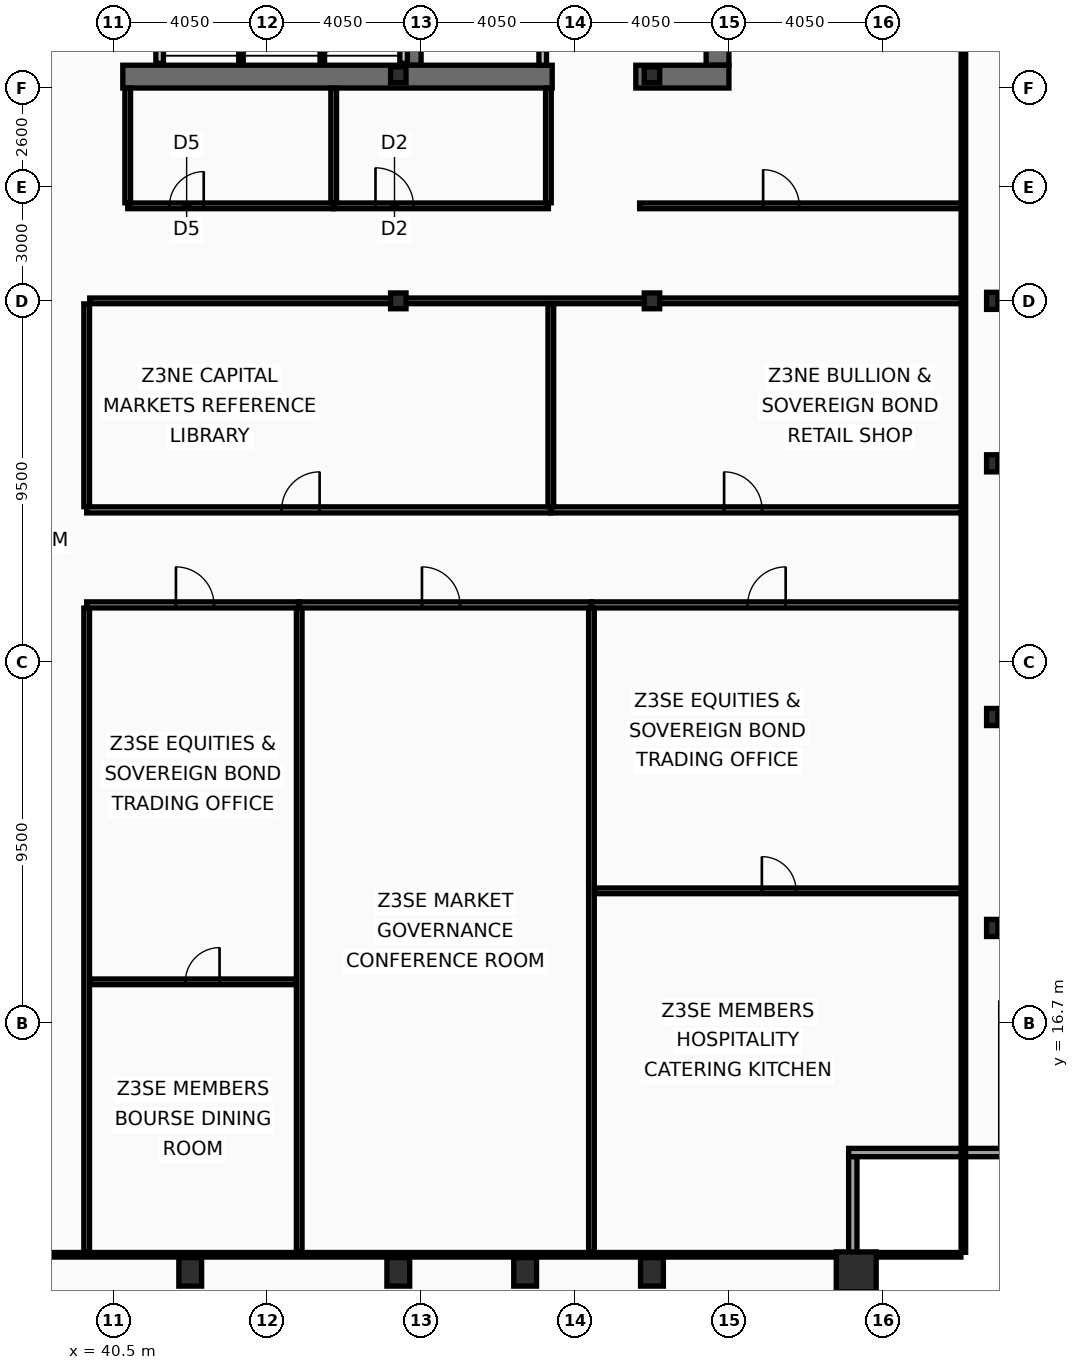
"""IFC4 building model, lengths in metres.
Left out: names, types, materials, properties, quantities, classifications, styles, units other than length and angle.
Written with IfcOpenShell. Run it as: python <this file> out.ifc"""

import sys

from ifc_helpers import new_model, si_unit, direction, frame, frame_2d, origin, origin_2d, place, context, subcontext, project, spatial, rectangle, hollow_rectangle, i_section, extrude, element, fill, save


model = new_model("IFC4")
c1 = context("Model", 3, precision=1e-05, world=origin(), true_north=direction((0.0, 1.0)))
c2 = subcontext(c1, "Body", "Model", "MODEL_VIEW")
j1 = project(units=[si_unit("LENGTHUNIT", "METRE"), si_unit("PLANEANGLEUNIT", "RADIAN")], contexts=[c1])
p1 = place(None, origin())
s1 = spatial("IfcSite", under=j1, at=p1, CompositionType="ELEMENT")
p2 = place(p1, origin())
s2 = spatial("IfcBuilding", under=s1, at=p2, CompositionType="ELEMENT")
p3 = place(p2, frame((0.0, 0.0, 242.6)))
s3 = spatial("IfcBuildingStorey", under=s2, at=p3, CompositionType="ELEMENT", Elevation=242.6)
p4 = place(p3, frame((56.4, 53.1, 0.0), z_axis=(0.0, 0.0, 1.0), x_axis=(0.0, -1.0, 0.0)))
e1 = element("IfcWall", 1, at=p4, inside=s3, PredefinedType="SHEAR", context=c2, shape_type="SweptSolid", body=[
    extrude(rectangle(XDim=11.2, YDim=0.6, at=frame_2d((5.6, 0.0))), origin(), (0.0, 0.0, 1.0), 3.44),
])
p5 = place(p3, frame((48.4, 41.9, 0.0), z_axis=(0.0, 0.0, 1.0), x_axis=(0.0, 1.0, 0.0)))
e2 = element("IfcWall", 2, at=p5, inside=s3, PredefinedType="SHEAR", context=c2, shape_type="SweptSolid", body=[
    extrude(rectangle(XDim=11.2, YDim=0.4, at=frame_2d((5.6, 0.0))), origin(), (0.0, 0.0, 1.0), 3.44),
])
p6 = place(p3, frame((52.05, 41.6, 0.0), z_axis=(0.0, 0.0, 1.0), x_axis=(-1.0, 0.0, 0.0)))
e3 = element("IfcWall", 3, at=p6, inside=s3, PredefinedType="SHEAR", context=c2, shape_type="SweptSolid", body=[
    extrude(rectangle(XDim=11.3, YDim=0.6, at=frame_2d((5.65, 0.0))), origin(), (0.0, 0.0, 1.0), 3.44),
])
p7 = place(p3, frame((56.7, 41.6, 0.0), z_axis=(0.0, 0.0, 1.0), x_axis=(-1.0, 0.0, 0.0)))
e4 = element("IfcWall", 4, at=p7, inside=s3, PredefinedType="SHEAR", context=c2, shape_type="SweptSolid", body=[
    extrude(rectangle(XDim=2.45, YDim=0.6, at=frame_2d((1.225, 0.0))), origin(), (0.0, 0.0, 1.0), 3.44),
])
p8 = place(p3, frame((60.05, 10.15, 0.0), z_axis=(0.0, 0.0, 1.0), x_axis=(1.0, 0.0, 0.0)))
e5 = element("IfcColumn", 5, at=p8, inside=s3, PredefinedType="COLUMN", context=c2, shape_type="SweptSolid", body=[
    extrude(hollow_rectangle(XDim=1.05, YDim=1.05, WallThickness=0.055, at=origin_2d()), origin(), (0.0, 0.0, 1.0), 3.6),
])
for number, where, z_axis, x_axis in (
    (6, (42.525, 10.15, 0.0), (0.0, 0.0, 1.0), (1.0, 0.0, 0.0)),
    (7, (48.0, 10.15, 0.0), (0.0, 0.0, 1.0), (1.0, 0.0, 0.0)),
    (8, (51.337, 10.15, 0.0), (0.0, 0.0, 1.0), (1.0, 0.0, 0.0)),
    (9, (54.675, 10.15, 0.0), (0.0, 0.0, 1.0), (1.0, 0.0, 0.0)),
):
    element("IfcColumn", number, at=place(p3, frame(where, z_axis=z_axis, x_axis=x_axis)), inside=s3, PredefinedType="COLUMN", context=c2, shape_type="SweptSolid", body=[
        extrude(hollow_rectangle(XDim=0.6, YDim=0.75, WallThickness=0.045, at=origin_2d()), origin(), (0.0, 0.0, 1.0), 3.6),
    ])
for number, where, z_axis, x_axis in (
    (10, (63.63, 19.2, 0.0), (0.0, 0.0, 1.0), (1.0, 0.0, 0.0)),
    (11, (63.63, 24.75, 0.0), (0.0, 0.0, 1.0), (1.0, 0.0, 0.0)),
    (12, (63.63, 31.425, 0.0), (0.0, 0.0, 1.0), (1.0, 0.0, 0.0)),
    (13, (63.63, 35.7, 0.0), (0.0, 0.0, 1.0), (1.0, 0.0, 0.0)),
):
    element("IfcColumn", number, at=place(p3, frame(where, z_axis=z_axis, x_axis=x_axis)), inside=s3, PredefinedType="COLUMN", context=c2, shape_type="SweptSolid", body=[
        extrude(i_section(OverallWidth=0.3, OverallDepth=0.45, WebThickness=0.014, FlangeThickness=0.026, at=origin_2d()), origin(), (0.0, 0.0, 1.0), 3.6),
    ])
for number, where, z_axis, x_axis in (
    (14, (48.0, 35.7, 0.0), (0.0, 0.0, 1.0), (1.0, 0.0, 0.0)),
    (15, (48.0, 41.65, 0.0), (0.0, 0.0, 1.0), (1.0, 0.0, 0.0)),
    (16, (54.675, 35.7, 0.0), (0.0, 0.0, 1.0), (1.0, 0.0, 0.0)),
    (17, (54.675, 41.65, 0.0), (0.0, 0.0, 1.0), (1.0, 0.0, 0.0)),
):
    element("IfcColumn", number, at=place(p3, frame(where, z_axis=z_axis, x_axis=x_axis)), inside=s3, PredefinedType="COLUMN", context=c2, shape_type="SweptSolid", body=[
        extrude(i_section(OverallWidth=0.406, OverallDepth=0.416, WebThickness=0.03, FlangeThickness=0.048, at=origin_2d()), origin(), (0.0, 0.0, 1.0), 3.6),
    ])
p9 = place(p3, frame((64.07, 13.29, 0.0), z_axis=(0.0, 0.0, 1.0), x_axis=(-1.0, 0.0, 0.0)))
e18 = element("IfcWall", 18, at=p9, inside=s3, PredefinedType="SOLIDWALL", context=c2, shape_type="SweptSolid", body=[
    extrude(rectangle(XDim=4.22, YDim=0.22, at=frame_2d((2.11, 0.0))), origin(), (0.0, 0.0, 1.0), 2.83),
])
p10 = place(p3, frame((59.96, 13.18, 0.0), z_axis=(0.0, 0.0, 1.0), x_axis=(0.0, -1.0, 0.0)))
e19 = element("IfcWall", 19, at=p10, inside=s3, PredefinedType="SOLIDWALL", context=c2, shape_type="SweptSolid", body=[
    extrude(rectangle(XDim=3.91, YDim=0.22, at=frame_2d((1.955, 0.0))), origin(), (0.0, 0.0, 1.0), 2.83),
])
p11 = place(p3, frame((51.8, 41.9, 0.0), z_axis=(0.0, 0.0, 1.0), x_axis=(0.0, 1.0, 0.0)))
e20 = element("IfcWall", 20, at=p11, inside=s3, PredefinedType="PARTITIONING", context=c2, shape_type="SweptSolid", body=[
    extrude(rectangle(XDim=2.595, YDim=0.2, at=frame_2d((1.298, 0.0))), origin(), (0.0, 0.0, 1.0), 3.44),
])
p12 = place(p11, frame((0.38, 0.0, 0.0)))
e21 = element("IfcOpeningElement", 21, at=p12, cuts=e20, PredefinedType="OPENING", context=c2, shape_type="SweptSolid", body=[
    extrude(rectangle(XDim=1.05, YDim=2.15, at=frame_2d((0.525, 1.075))), frame((0.0, 0.11, 0.0), z_axis=(0.0, -1.0, 0.0), x_axis=(1.0, 0.0, 0.0)), (0.0, 0.0, 1.0), 0.22),
])
for number, where, z_axis, x_axis in (
    (22, (41.72, 41.95, 0.0), (0.0, 0.0, 1.0), (0.0, 1.0, 0.0)),
    (23, (48.14, 41.95, 0.0), (0.0, 0.0, 1.0), (0.0, 1.0, 0.0)),
):
    element("IfcWall", number, at=place(p3, frame(where, z_axis=z_axis, x_axis=x_axis)), inside=s3, PredefinedType="PARTITIONING", context=c2, shape_type="SweptSolid", body=[
        extrude(rectangle(XDim=2.295, YDim=0.2, at=frame_2d((1.147, 0.0))), origin(), (0.0, 0.0, 1.0), 3.44),
    ])
for number, where, z_axis, x_axis in (
    (24, (43.86, 41.95, 0.0), (0.0, 0.0, 1.0), (0.0, 1.0, 0.0)),
    (25, (46.0, 41.95, 0.0), (0.0, 0.0, 1.0), (0.0, 1.0, 0.0)),
):
    element("IfcWall", number, at=place(p3, frame(where, z_axis=z_axis, x_axis=x_axis)), inside=s3, PredefinedType="PARTITIONING", context=c2, shape_type="SweptSolid", body=[
        extrude(rectangle(XDim=2.295, YDim=0.12, at=frame_2d((1.147, 0.0))), origin(), (0.0, 0.0, 1.0), 3.44),
    ])
p13 = place(p3, frame((40.88, 38.2, 0.0), z_axis=(0.0, 0.0, 1.0), x_axis=(1.0, 0.0, 0.0)))
e26 = element("IfcWall", 26, at=p13, inside=s3, PredefinedType="PARTITIONING", context=c2, shape_type="SweptSolid", body=[
    extrude(rectangle(XDim=5.42, YDim=0.15, at=frame_2d((2.71, 0.0))), origin(), (0.0, 0.0, 1.0), 2.78),
])
p14 = place(p13, frame((1.1, 0.0, 0.0)))
e27 = element("IfcOpeningElement", 27, at=p14, cuts=e26, PredefinedType="OPENING", context=c2, shape_type="SweptSolid", body=[
    extrude(rectangle(XDim=0.9, YDim=2.05, at=frame_2d((0.45, 1.025))), frame((0.0, 0.085, 0.0), z_axis=(0.0, -1.0, 0.0), x_axis=(1.0, 0.0, 0.0)), (0.0, 0.0, 1.0), 0.17),
])
p15 = place(p3, frame((46.3, 38.2, 0.0), z_axis=(0.0, 0.0, 1.0), x_axis=(1.0, 0.0, 0.0)))
e28 = element("IfcWall", 28, at=p15, inside=s3, PredefinedType="PARTITIONING", context=c2, shape_type="SweptSolid", body=[
    extrude(rectangle(XDim=5.65, YDim=0.15, at=frame_2d((2.825, 0.0))), origin(), (0.0, 0.0, 1.0), 2.78),
])
p16 = place(p15, frame((1.1, 0.0, 0.0)))
e29 = element("IfcOpeningElement", 29, at=p16, cuts=e28, PredefinedType="OPENING", context=c2, shape_type="SweptSolid", body=[
    extrude(rectangle(XDim=1.0, YDim=2.05, at=frame_2d((0.5, 1.025))), frame((0.0, 0.085, 0.0), z_axis=(0.0, -1.0, 0.0), x_axis=(1.0, 0.0, 0.0)), (0.0, 0.0, 1.0), 0.17),
])
for number, where, z_axis, x_axis in (
    (30, (40.88, 38.28, 0.0), (0.0, 0.0, 1.0), (0.0, 1.0, 0.0)),
    (31, (46.3, 38.28, 0.0), (0.0, 0.0, 1.0), (0.0, 1.0, 0.0)),
    (32, (51.95, 38.28, 0.0), (0.0, 0.0, 1.0), (0.0, 1.0, 0.0)),
):
    element("IfcWall", number, at=place(p3, frame(where, z_axis=z_axis, x_axis=x_axis)), inside=s3, PredefinedType="PARTITIONING", context=c2, shape_type="SweptSolid", body=[
        extrude(rectangle(XDim=3.02, YDim=0.15, at=frame_2d((1.51, 0.0))), origin(), (0.0, 0.0, 1.0), 3.44),
    ])
p17 = place(p3, frame((54.35, 38.2, 0.0), z_axis=(0.0, 0.0, 1.0), x_axis=(1.0, 0.0, 0.0)))
e33 = element("IfcWall", 33, at=p17, inside=s3, PredefinedType="PARTITIONING", context=c2, shape_type="SweptSolid", body=[
    extrude(rectangle(XDim=8.52, YDim=0.15, at=frame_2d((4.26, 0.0))), origin(), (0.0, 0.0, 1.0), 2.78),
])
p18 = place(p17, frame((3.25, 0.0, 0.0)))
e34 = element("IfcOpeningElement", 34, at=p18, cuts=e33, PredefinedType="OPENING", context=c2, shape_type="SweptSolid", body=[
    extrude(rectangle(XDim=0.95, YDim=2.05, at=frame_2d((0.475, 1.025))), frame((0.0, 0.085, 0.0), z_axis=(0.0, -1.0, 0.0), x_axis=(1.0, 0.0, 0.0)), (0.0, 0.0, 1.0), 0.17),
])
p19 = place(p3, frame((39.8, 10.665, 0.0), z_axis=(0.0, 0.0, 1.0), x_axis=(0.0, 1.0, 0.0)))
e35 = element("IfcWall", 35, at=p19, inside=s3, PredefinedType="PARTITIONING", context=c2, shape_type="SweptSolid", body=[
    extrude(rectangle(XDim=16.95, YDim=0.15, at=frame_2d((8.475, 0.0))), origin(), (0.0, 0.0, 1.0), 2.98),
])
p20 = place(p3, frame((39.8, 30.285, 0.0), z_axis=(0.0, 0.0, 1.0), x_axis=(0.0, 1.0, 0.0)))
e36 = element("IfcWall", 36, at=p20, inside=s3, PredefinedType="PARTITIONING", context=c2, shape_type="SweptSolid", body=[
    extrude(rectangle(XDim=5.335, YDim=0.15, at=frame_2d((2.667, 0.0))), origin(), (0.0, 0.0, 1.0), 2.98),
])
p21 = place(p3, frame((39.88, 35.7, 0.0), z_axis=(0.0, 0.0, 1.0), x_axis=(1.0, 0.0, 0.0)))
e37 = element("IfcWall", 37, at=p21, inside=s3, PredefinedType="PARTITIONING", context=c2, shape_type="SweptSolid", body=[
    extrude(rectangle(XDim=22.925, YDim=0.15, at=frame_2d((11.462, 0.0))), origin(), (0.0, 0.0, 1.0), 2.78),
])
p22 = place(p3, frame((39.8, 27.7, 0.0), z_axis=(0.0, 0.0, 1.0), x_axis=(1.0, 0.0, 0.0)))
e38 = element("IfcWall", 38, at=p22, inside=s3, PredefinedType="PARTITIONING", context=c2, shape_type="SweptSolid", body=[
    extrude(rectangle(XDim=5.593, YDim=0.16, at=frame_2d((2.796, 0.0))), origin(), (0.0, 0.0, 1.0), 2.78),
])
p23 = place(p22, frame((2.349, 0.0, 0.0)))
e39 = element("IfcOpeningElement", 39, at=p23, cuts=e38, PredefinedType="OPENING", context=c2, shape_type="SweptSolid", body=[
    extrude(rectangle(XDim=1.0, YDim=2.05, at=frame_2d((0.5, 1.025))), frame((0.0, 0.09, 0.0), z_axis=(0.0, -1.0, 0.0), x_axis=(1.0, 0.0, 0.0)), (0.0, 0.0, 1.0), 0.18),
])
p24 = place(p3, frame((39.88, 17.782, 0.0), z_axis=(0.0, 0.0, 1.0), x_axis=(1.0, 0.0, 0.0)))
e40 = element("IfcWall", 40, at=p24, inside=s3, PredefinedType="PARTITIONING", context=c2, shape_type="SweptSolid", body=[
    extrude(rectangle(XDim=5.433, YDim=0.15, at=frame_2d((2.716, 0.0))), origin(), (0.0, 0.0, 1.0), 2.78),
])
p25 = place(p24, frame((2.517, 0.0, 0.0)))
e41 = element("IfcOpeningElement", 41, at=p25, cuts=e40, PredefinedType="OPENING", context=c2, shape_type="SweptSolid", body=[
    extrude(rectangle(XDim=0.9, YDim=2.05, at=frame_2d((0.45, 1.025))), frame((0.0, 0.085, 0.0), z_axis=(0.0, -1.0, 0.0), x_axis=(1.0, 0.0, 0.0)), (0.0, 0.0, 1.0), 0.17),
])
p26 = place(p3, frame((45.393, 27.7, 0.0), z_axis=(0.0, 0.0, 1.0), x_axis=(1.0, 0.0, 0.0)))
e42 = element("IfcWall", 42, at=p26, inside=s3, PredefinedType="PARTITIONING", context=c2, shape_type="SweptSolid", body=[
    extrude(rectangle(XDim=7.69, YDim=0.16, at=frame_2d((3.845, 0.0))), origin(), (0.0, 0.0, 1.0), 2.78),
])
p27 = place(p26, frame((3.23, 0.0, 0.0)))
e43 = element("IfcOpeningElement", 43, at=p27, cuts=e42, PredefinedType="OPENING", context=c2, shape_type="SweptSolid", body=[
    extrude(rectangle(XDim=1.0, YDim=2.05, at=frame_2d((0.5, 1.025))), frame((0.0, 0.09, 0.0), z_axis=(0.0, -1.0, 0.0), x_axis=(1.0, 0.0, 0.0)), (0.0, 0.0, 1.0), 0.18),
])
p28 = place(p3, frame((45.393, 10.665, 0.0), z_axis=(0.0, 0.0, 1.0), x_axis=(0.0, 1.0, 0.0)))
e44 = element("IfcWall", 44, at=p28, inside=s3, PredefinedType="PARTITIONING", context=c2, shape_type="SweptSolid", body=[
    extrude(rectangle(XDim=16.95, YDim=0.15, at=frame_2d((8.475, 0.0))), origin(), (0.0, 0.0, 1.0), 2.98),
])
p29 = place(p3, frame((53.083, 27.7, 0.0), z_axis=(0.0, 0.0, 1.0), x_axis=(1.0, 0.0, 0.0)))
e45 = element("IfcWall", 45, at=p29, inside=s3, PredefinedType="PARTITIONING", context=c2, shape_type="SweptSolid", body=[
    extrude(rectangle(XDim=9.787, YDim=0.16, at=frame_2d((4.894, 0.0))), origin(), (0.0, 0.0, 1.0), 2.78),
])
p30 = place(p29, frame((4.111, 0.0, 0.0)))
e46 = element("IfcOpeningElement", 46, at=p30, cuts=e45, PredefinedType="OPENING", context=c2, shape_type="SweptSolid", body=[
    extrude(rectangle(XDim=1.0, YDim=2.05, at=frame_2d((0.5, 1.025))), frame((0.0, 0.09, 0.0), z_axis=(0.0, -1.0, 0.0), x_axis=(1.0, 0.0, 0.0)), (0.0, 0.0, 1.0), 0.18),
])
p31 = place(p3, frame((53.083, 10.665, 0.0), z_axis=(0.0, 0.0, 1.0), x_axis=(0.0, 1.0, 0.0)))
e47 = element("IfcWall", 47, at=p31, inside=s3, PredefinedType="PARTITIONING", context=c2, shape_type="SweptSolid", body=[
    extrude(rectangle(XDim=16.95, YDim=0.15, at=frame_2d((8.475, 0.0))), origin(), (0.0, 0.0, 1.0), 2.98),
])
p32 = place(p3, frame((53.163, 20.176, 0.0), z_axis=(0.0, 0.0, 1.0), x_axis=(1.0, 0.0, 0.0)))
e48 = element("IfcWall", 48, at=p32, inside=s3, PredefinedType="PARTITIONING", context=c2, shape_type="SweptSolid", body=[
    extrude(rectangle(XDim=9.642, YDim=0.15, at=frame_2d((4.821, 0.0))), origin(), (0.0, 0.0, 1.0), 2.78),
])
p33 = place(p32, frame((4.404, 0.0, 0.0)))
e49 = element("IfcOpeningElement", 49, at=p33, cuts=e48, PredefinedType="OPENING", context=c2, shape_type="SweptSolid", body=[
    extrude(rectangle(XDim=0.9, YDim=2.05, at=frame_2d((0.45, 1.025))), frame((0.0, 0.085, 0.0), z_axis=(0.0, -1.0, 0.0), x_axis=(1.0, 0.0, 0.0)), (0.0, 0.0, 1.0), 0.17),
])
p34 = place(p3, frame((39.8, 30.2, 0.0), z_axis=(0.0, 0.0, 1.0), x_axis=(1.0, 0.0, 0.0)))
e50 = element("IfcWall", 50, at=p34, inside=s3, PredefinedType="PARTITIONING", context=c2, shape_type="SweptSolid", body=[
    extrude(rectangle(XDim=12.213, YDim=0.16, at=frame_2d((6.107, 0.0))), origin(), (0.0, 0.0, 1.0), 2.78),
])
p35 = place(p34, frame((5.13, 0.0, 0.0)))
e51 = element("IfcOpeningElement", 51, at=p35, cuts=e50, PredefinedType="OPENING", context=c2, shape_type="SweptSolid", body=[
    extrude(rectangle(XDim=1.0, YDim=2.05, at=frame_2d((0.5, 1.025))), frame((0.0, 0.09, 0.0), z_axis=(0.0, -1.0, 0.0), x_axis=(1.0, 0.0, 0.0)), (0.0, 0.0, 1.0), 0.18),
])
p36 = place(p3, frame((52.013, 30.2, 0.0), z_axis=(0.0, 0.0, 1.0), x_axis=(1.0, 0.0, 0.0)))
e52 = element("IfcWall", 52, at=p36, inside=s3, PredefinedType="PARTITIONING", context=c2, shape_type="SweptSolid", body=[
    extrude(rectangle(XDim=10.857, YDim=0.16, at=frame_2d((5.428, 0.0))), origin(), (0.0, 0.0, 1.0), 2.78),
])
p37 = place(p36, frame((4.56, 0.0, 0.0)))
e53 = element("IfcOpeningElement", 53, at=p37, cuts=e52, PredefinedType="OPENING", context=c2, shape_type="SweptSolid", body=[
    extrude(rectangle(XDim=1.0, YDim=2.05, at=frame_2d((0.5, 1.025))), frame((0.0, 0.09, 0.0), z_axis=(0.0, -1.0, 0.0), x_axis=(1.0, 0.0, 0.0)), (0.0, 0.0, 1.0), 0.18),
])
p38 = place(p3, frame((52.013, 30.285, 0.0), z_axis=(0.0, 0.0, 1.0), x_axis=(0.0, 1.0, 0.0)))
e54 = element("IfcWall", 54, at=p38, inside=s3, PredefinedType="PARTITIONING", context=c2, shape_type="SweptSolid", body=[
    extrude(rectangle(XDim=5.335, YDim=0.15, at=frame_2d((2.667, 0.0))), origin(), (0.0, 0.0, 1.0), 2.98),
])
p39 = place(p3, frame((62.87, 10.665, 0.0), z_axis=(0.0, 0.0, 1.0), x_axis=(0.0, 1.0, 0.0)))
e55 = element("IfcWall", 55, at=p39, inside=s3, PredefinedType="PARTITIONING", context=c2, shape_type="SweptSolid", body=[
    extrude(rectangle(XDim=42.11, YDim=0.12, at=frame_2d((21.055, 0.0))), origin(), (0.0, 0.0, 1.0), 2.78),
])
p40 = place(p3, frame((10.095, 10.6, 0.0), z_axis=(0.0, 0.0, 1.0), x_axis=(1.0, 0.0, 0.0)))
e56 = element("IfcWall", 56, at=p40, inside=s3, PredefinedType="PARTITIONING", context=c2, shape_type="SweptSolid", body=[
    extrude(rectangle(XDim=52.71, YDim=0.12, at=frame_2d((26.355, 0.0))), origin(), (0.0, 0.0, 1.0), 2.78),
])
p41 = place(p14, origin())
e57 = element("IfcDoor", 57, at=p41, inside=s3, OperationType="SINGLE_SWING_RIGHT", PredefinedType="DOOR", context=c2, shape_type="SweptSolid", body=[
    extrude(rectangle(XDim=0.9, YDim=2.05, at=frame_2d((0.45, 1.025))), frame((0.0, 0.025, 0.0), z_axis=(0.0, -1.0, 0.0), x_axis=(1.0, 0.0, 0.0)), (0.0, 0.0, 1.0), 0.05),
])
fill(e27, e57)
p42 = place(p16, origin())
e58 = element("IfcDoor", 58, at=p42, inside=s3, OperationType="SINGLE_SWING_LEFT", PredefinedType="DOOR", context=c2, shape_type="SweptSolid", body=[
    extrude(rectangle(XDim=1.0, YDim=2.05, at=frame_2d((0.5, 1.025))), frame((0.0, 0.025, 0.0), z_axis=(0.0, -1.0, 0.0), x_axis=(1.0, 0.0, 0.0)), (0.0, 0.0, 1.0), 0.05),
])
fill(e29, e58)
p43 = place(p18, origin())
e59 = element("IfcDoor", 59, at=p43, inside=s3, OperationType="SINGLE_SWING_LEFT", PredefinedType="DOOR", context=c2, shape_type="SweptSolid", body=[
    extrude(rectangle(XDim=0.95, YDim=2.05, at=frame_2d((0.475, 1.025))), frame((0.0, 0.025, 0.0), z_axis=(0.0, -1.0, 0.0), x_axis=(1.0, 0.0, 0.0)), (0.0, 0.0, 1.0), 0.05),
])
fill(e34, e59)
p44 = place(p23, origin())
e60 = element("IfcDoor", 60, at=p44, inside=s3, OperationType="SINGLE_SWING_LEFT", PredefinedType="DOOR", context=c2, shape_type="SweptSolid", body=[
    extrude(rectangle(XDim=1.0, YDim=2.05, at=frame_2d((0.5, 1.025))), frame((0.0, 0.025, 0.0), z_axis=(0.0, -1.0, 0.0), x_axis=(1.0, 0.0, 0.0)), (0.0, 0.0, 1.0), 0.05),
])
fill(e39, e60)
p45 = place(p25, origin())
e61 = element("IfcDoor", 61, at=p45, inside=s3, OperationType="SINGLE_SWING_RIGHT", PredefinedType="DOOR", context=c2, shape_type="SweptSolid", body=[
    extrude(rectangle(XDim=0.9, YDim=2.05, at=frame_2d((0.45, 1.025))), frame((0.0, 0.025, 0.0), z_axis=(0.0, -1.0, 0.0), x_axis=(1.0, 0.0, 0.0)), (0.0, 0.0, 1.0), 0.05),
])
fill(e41, e61)
p46 = place(p27, origin())
e62 = element("IfcDoor", 62, at=p46, inside=s3, OperationType="SINGLE_SWING_LEFT", PredefinedType="DOOR", context=c2, shape_type="SweptSolid", body=[
    extrude(rectangle(XDim=1.0, YDim=2.05, at=frame_2d((0.5, 1.025))), frame((0.0, 0.025, 0.0), z_axis=(0.0, -1.0, 0.0), x_axis=(1.0, 0.0, 0.0)), (0.0, 0.0, 1.0), 0.05),
])
fill(e43, e62)
p47 = place(p30, origin())
e63 = element("IfcDoor", 63, at=p47, inside=s3, OperationType="SINGLE_SWING_RIGHT", PredefinedType="DOOR", context=c2, shape_type="SweptSolid", body=[
    extrude(rectangle(XDim=1.0, YDim=2.05, at=frame_2d((0.5, 1.025))), frame((0.0, 0.025, 0.0), z_axis=(0.0, -1.0, 0.0), x_axis=(1.0, 0.0, 0.0)), (0.0, 0.0, 1.0), 0.05),
])
fill(e46, e63)
p48 = place(p33, origin())
e64 = element("IfcDoor", 64, at=p48, inside=s3, OperationType="SINGLE_SWING_LEFT", PredefinedType="DOOR", context=c2, shape_type="SweptSolid", body=[
    extrude(rectangle(XDim=0.9, YDim=2.05, at=frame_2d((0.45, 1.025))), frame((0.0, 0.025, 0.0), z_axis=(0.0, -1.0, 0.0), x_axis=(1.0, 0.0, 0.0)), (0.0, 0.0, 1.0), 0.05),
])
fill(e49, e64)
p49 = place(p35, origin())
e65 = element("IfcDoor", 65, at=p49, inside=s3, OperationType="SINGLE_SWING_RIGHT", PredefinedType="DOOR", context=c2, shape_type="SweptSolid", body=[
    extrude(rectangle(XDim=1.0, YDim=2.05, at=frame_2d((0.5, 1.025))), frame((0.0, 0.025, 0.0), z_axis=(0.0, -1.0, 0.0), x_axis=(1.0, 0.0, 0.0)), (0.0, 0.0, 1.0), 0.05),
])
fill(e51, e65)
p50 = place(p37, origin())
e66 = element("IfcDoor", 66, at=p50, inside=s3, OperationType="SINGLE_SWING_LEFT", PredefinedType="DOOR", context=c2, shape_type="SweptSolid", body=[
    extrude(rectangle(XDim=1.0, YDim=2.05, at=frame_2d((0.5, 1.025))), frame((0.0, 0.025, 0.0), z_axis=(0.0, -1.0, 0.0), x_axis=(1.0, 0.0, 0.0)), (0.0, 0.0, 1.0), 0.05),
])
fill(e53, e66)
save(model, sys.argv[1])
